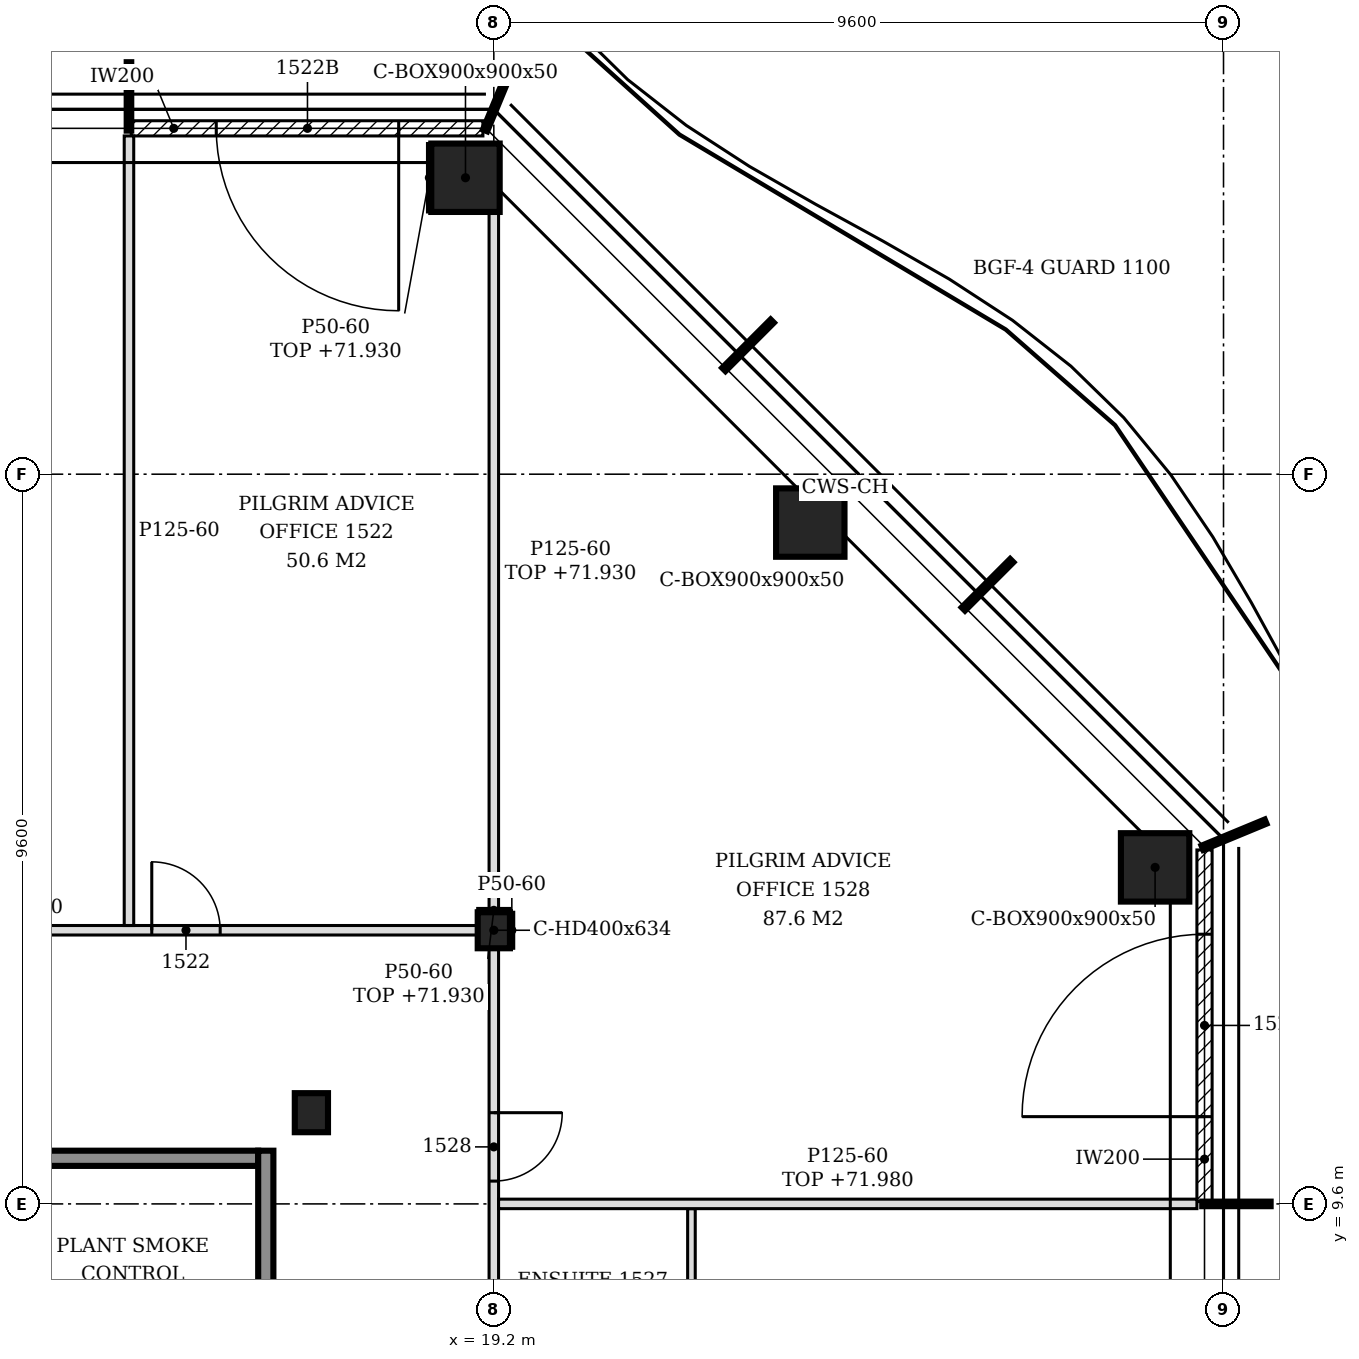
"""IFC4 building model, lengths in metres.
Left out: names, types, materials, properties, quantities, classifications, styles, units other than length and angle.
Written with IfcOpenShell. Run it as: python <this file> out.ifc"""

import sys

from ifc_helpers import new_model, si_unit, direction, frame, frame_2d, origin, origin_2d, place, context, subcontext, project, spatial, polyline, rectangle, hollow_rectangle, i_section, outline, extrude, element, fill, save


model = new_model("IFC4")
c1 = context("Model", 3, precision=1e-05, world=origin(), true_north=direction((0.0, 1.0)))
c2 = subcontext(c1, "Body", "Model", "MODEL_VIEW")
j1 = project(units=[si_unit("LENGTHUNIT", "METRE"), si_unit("PLANEANGLEUNIT", "RADIAN")], contexts=[c1])
p1 = place(None, origin())
s1 = spatial("IfcSite", under=j1, at=p1, CompositionType="ELEMENT")
p2 = place(p1, origin())
s2 = spatial("IfcBuilding", under=s1, at=p2, CompositionType="ELEMENT")
p3 = place(p2, frame((0.0, 0.0, 69.0)))
s3 = spatial("IfcBuildingStorey", under=s2, at=p3, CompositionType="ELEMENT", Elevation=69.0)
for number, where, z_axis, x_axis in (
    (1, (27.9, 14.027, -0.15), (0.0, 0.0, 1.0), (1.0, 0.0, 0.0)),
    (2, (23.364, 18.564, -0.15), (0.0, 0.0, 1.0), (1.0, 0.0, 0.0)),
    (3, (18.827, 23.1, -0.15), (0.0, 0.0, 1.0), (1.0, 0.0, 0.0)),
):
    element("IfcColumn", number, at=place(p3, frame(where, z_axis=z_axis, x_axis=x_axis)), inside=s3, PredefinedType="COLUMN", context=c2, shape_type="SweptSolid", body=[
        extrude(hollow_rectangle(XDim=0.9, YDim=0.9, WallThickness=0.05, at=origin_2d()), origin(), (0.0, 0.0, 1.0), 3.6),
    ])
p4 = place(p3, frame((19.2, 13.2, -0.15), z_axis=(0.0, 0.0, 1.0), x_axis=(1.0, 0.0, 0.0)))
e4 = element("IfcColumn", 4, at=p4, inside=s3, PredefinedType="COLUMN", context=c2, shape_type="SweptSolid", body=[
    extrude(i_section(OverallWidth=0.424, OverallDepth=0.474, WebThickness=0.048, FlangeThickness=0.077, FilletRadius=0.015, at=origin_2d()), origin(), (0.0, 0.0, 1.0), 3.6),
])
p5 = place(p3, frame((16.8, 10.8, -0.15), z_axis=(0.0, 0.0, 1.0), x_axis=(1.0, 0.0, 0.0)))
e5 = element("IfcColumn", 5, at=p5, inside=s3, PredefinedType="COLUMN", context=c2, shape_type="SweptSolid", body=[
    extrude(i_section(OverallWidth=0.437, OverallDepth=0.514, WebThickness=0.061, FlangeThickness=0.097, FilletRadius=0.015, at=origin_2d()), origin(), (0.0, 0.0, 1.0), 3.6),
])
p6 = place(p3, frame((28.55, 9.63, 0.0), z_axis=(0.0, 0.0, 1.0), x_axis=(0.0, 1.0, 0.0)))
e6 = element("IfcWall", 6, at=p6, inside=s3, PredefinedType="NOTDEFINED", context=c2, shape_type="SweptSolid", body=[
    extrude(rectangle(XDim=4.626, YDim=0.2, at=frame_2d((2.313, 0.0))), origin(), (0.0, 0.0, 1.0), 3.45),
])
p7 = place(p6, frame((1.118, 0.0, 0.0)))
e7 = element("IfcOpeningElement", 7, at=p7, cuts=e6, PredefinedType="OPENING", context=c2, shape_type="SweptSolid", body=[
    extrude(rectangle(XDim=2.4, YDim=2.4, at=frame_2d((1.2, 1.2))), frame((0.0, 0.11, 0.0), z_axis=(0.0, -1.0, 0.0), x_axis=(1.0, 0.0, 0.0)), (0.0, 0.0, 1.0), 0.22),
])
p8 = place(p3, frame((19.056, 23.75, 0.0), z_axis=(0.0, 0.0, 1.0), x_axis=(-1.0, 0.0, 0.0)))
e8 = element("IfcWall", 8, at=p8, inside=s3, PredefinedType="NOTDEFINED", context=c2, shape_type="SweptSolid", body=[
    extrude(rectangle(XDim=4.626, YDim=0.2, at=frame_2d((2.313, 0.0))), origin(), (0.0, 0.0, 1.0), 3.45),
])
p9 = place(p8, frame((1.108, 0.0, 0.0)))
e9 = element("IfcOpeningElement", 9, at=p9, cuts=e8, PredefinedType="OPENING", context=c2, shape_type="SweptSolid", body=[
    extrude(rectangle(XDim=2.4, YDim=2.4, at=frame_2d((1.2, 1.2))), frame((0.0, 0.11, 0.0), z_axis=(0.0, -1.0, 0.0), x_axis=(1.0, 0.0, 0.0)), (0.0, 0.0, 1.0), 0.22),
])
p10 = place(p3, frame((12.7, 10.2, 0.0), z_axis=(0.0, 0.0, 1.0), x_axis=(1.0, 0.0, 0.0)))
e10 = element("IfcWall", 10, at=p10, inside=s3, PredefinedType="SOLIDWALL", context=c2, shape_type="SweptSolid", body=[
    extrude(rectangle(XDim=3.4, YDim=0.2, at=frame_2d((1.7, 0.0))), origin(), (0.0, 0.0, 1.0), 3.45),
])
p11 = place(p3, frame((16.2, -5.5, 0.0), z_axis=(0.0, 0.0, 1.0), x_axis=(0.0, 1.0, 0.0)))
e11 = element("IfcWall", 11, at=p11, inside=s3, PredefinedType="SOLIDWALL", context=c2, shape_type="SweptSolid", body=[
    extrude(rectangle(XDim=15.8, YDim=0.2, at=frame_2d((7.9, 0.0))), origin(), (0.0, 0.0, 1.0), 3.45),
])
p12 = place(p11, frame((3.05, 0.0, 0.0)))
e12 = element("IfcOpeningElement", 12, at=p12, cuts=e11, PredefinedType="OPENING", context=c2, shape_type="SweptSolid", body=[
    extrude(rectangle(XDim=1.3, YDim=2.1, at=frame_2d((0.65, 1.05))), frame((0.0, 0.11, 0.0), z_axis=(0.0, -1.0, 0.0), x_axis=(1.0, 0.0, 0.0)), (0.0, 0.0, 1.0), 0.22),
])
p13 = place(p11, frame((11.45, 0.0, 0.0)))
e13 = element("IfcOpeningElement", 13, at=p13, cuts=e11, PredefinedType="OPENING", context=c2, shape_type="SweptSolid", body=[
    extrude(rectangle(XDim=1.3, YDim=2.1, at=frame_2d((0.65, 1.05))), frame((0.0, 0.11, 0.0), z_axis=(0.0, -1.0, 0.0), x_axis=(1.0, 0.0, 0.0)), (0.0, 0.0, 1.0), 0.22),
])
p14 = place(p3, frame((19.2, 2.637, 0.0), z_axis=(0.0, 0.0, 1.0), x_axis=(0.0, 1.0, 0.0)))
e14 = element("IfcWall", 14, at=p14, inside=s3, PredefinedType="PARTITIONING", context=c2, shape_type="SweptSolid", body=[
    extrude(rectangle(XDim=10.326, YDim=0.125, at=frame_2d((5.163, 0.0))), origin(), (0.0, 0.0, 1.0), 2.83),
])
p15 = place(p14, frame((3.363, 0.0, 0.0)))
e15 = element("IfcOpeningElement", 15, at=p15, cuts=e14, PredefinedType="OPENING", context=c2, shape_type="SweptSolid", body=[
    extrude(rectangle(XDim=0.9, YDim=2.1, at=frame_2d((0.45, 1.05))), frame((0.0, 0.073, 0.0), z_axis=(0.0, -1.0, 0.0), x_axis=(1.0, 0.0, 0.0)), (0.0, 0.0, 1.0), 0.145),
])
p16 = place(p14, frame((7.263, 0.0, 0.0)))
e16 = element("IfcOpeningElement", 16, at=p16, cuts=e14, PredefinedType="OPENING", context=c2, shape_type="SweptSolid", body=[
    extrude(rectangle(XDim=0.9, YDim=2.1, at=frame_2d((0.45, 1.05))), frame((0.0, 0.073, 0.0), z_axis=(0.0, -1.0, 0.0), x_axis=(1.0, 0.0, 0.0)), (0.0, 0.0, 1.0), 0.145),
])
p17 = place(p3, frame((21.8, 7.25, 0.0), z_axis=(0.0, 0.0, 1.0), x_axis=(0.0, 1.0, 0.0)))
e17 = element("IfcWall", 17, at=p17, inside=s3, PredefinedType="PARTITIONING", context=c2, shape_type="SweptSolid", body=[
    extrude(outline(polyline([(0.0, 0.0), (2.288, 0.0), (2.288, 2.98), (2.255, 2.98), (2.253, 3.45), (0.0, 3.45), (0.0, 0.0)])), frame((0.0, 0.05, 0.0), z_axis=(0.0, -1.0, 0.0), x_axis=(1.0, 0.0, 0.0)), (0.0, 0.0, 1.0), 0.1),
])
p18 = place(p3, frame((19.262, 9.6, 0.0), z_axis=(0.0, 0.0, 1.0), x_axis=(1.0, 0.0, 0.0)))
e18 = element("IfcWall", 18, at=p18, inside=s3, PredefinedType="PARTITIONING", context=c2, shape_type="SweptSolid", body=[
    extrude(outline(polyline([(0.0, 0.0), (9.188, 0.0), (9.188, 2.98), (8.788, 2.98), (8.785, 2.93), (8.488, 2.93), (8.486, 2.98), (0.087, 2.98), (0.085, 2.83), (0.0, 2.83), (0.0, 0.0)])), frame((0.0, 0.062, 0.0), z_axis=(0.0, -1.0, 0.0), x_axis=(1.0, 0.0, 0.0)), (0.0, 0.0, 1.0), 0.125),
])
p19 = place(p3, frame((7.412, 13.2, 0.0), z_axis=(0.0, 0.0, 1.0), x_axis=(1.0, 0.0, 0.0)))
e19 = element("IfcWall", 19, at=p19, inside=s3, PredefinedType="PARTITIONING", context=c2, shape_type="SweptSolid", body=[
    extrude(rectangle(XDim=11.576, YDim=0.125, at=frame_2d((5.788, 0.0))), origin(), (0.0, 0.0, 1.0), 2.83),
])
p20 = place(p19, frame((0.788, 0.0, 0.0)))
e20 = element("IfcOpeningElement", 20, at=p20, cuts=e19, PredefinedType="OPENING", context=c2, shape_type="SweptSolid", body=[
    extrude(rectangle(XDim=0.9, YDim=2.1, at=frame_2d((0.45, 1.05))), frame((0.0, 0.073, 0.0), z_axis=(0.0, -1.0, 0.0), x_axis=(1.0, 0.0, 0.0)), (0.0, 0.0, 1.0), 0.145),
])
p21 = place(p19, frame((2.302, 0.0, 0.0)))
e21 = element("IfcOpeningElement", 21, at=p21, cuts=e19, PredefinedType="OPENING", context=c2, shape_type="SweptSolid", body=[
    extrude(rectangle(XDim=0.9, YDim=2.1, at=frame_2d((0.45, 1.05))), frame((0.0, 0.073, 0.0), z_axis=(0.0, -1.0, 0.0), x_axis=(1.0, 0.0, 0.0)), (0.0, 0.0, 1.0), 0.145),
])
p22 = place(p19, frame((7.288, 0.0, 0.0)))
e22 = element("IfcOpeningElement", 22, at=p22, cuts=e19, PredefinedType="OPENING", context=c2, shape_type="SweptSolid", body=[
    extrude(rectangle(XDim=0.9, YDim=2.1, at=frame_2d((0.45, 1.05))), frame((0.0, 0.073, 0.0), z_axis=(0.0, -1.0, 0.0), x_axis=(1.0, 0.0, 0.0)), (0.0, 0.0, 1.0), 0.145),
])
p23 = place(p3, frame((14.4, 13.262, 0.0), z_axis=(0.0, 0.0, 1.0), x_axis=(0.0, 1.0, 0.0)))
e23 = element("IfcWall", 23, at=p23, inside=s3, PredefinedType="PARTITIONING", context=c2, shape_type="SweptSolid", body=[
    extrude(outline(polyline([(0.0, 0.0), (10.387, 0.0), (10.387, 3.45), (9.988, 3.45), (9.986, 2.93), (9.688, 2.93), (9.686, 3.45), (6.042, 3.45), (6.041, 2.88), (5.833, 2.88), (5.831, 3.45), (0.087, 3.45), (0.085, 2.83), (0.0, 2.83), (0.0, 0.0)])), frame((0.0, 0.062, 0.0), z_axis=(0.0, -1.0, 0.0), x_axis=(1.0, 0.0, 0.0)), (0.0, 0.0, 1.0), 0.125),
])
p24 = place(p3, frame((19.2, 13.437, 0.0), z_axis=(0.0, 0.0, 1.0), x_axis=(0.0, 1.0, 0.0)))
e24 = element("IfcWall", 24, at=p24, inside=s3, PredefinedType="PARTITIONING", context=c2, shape_type="SweptSolid", body=[
    extrude(outline(polyline([(0.0, 0.0), (9.213, 0.0), (9.213, 2.63), (8.733, 2.63), (8.731, 2.93), (0.0, 2.93), (0.0, 0.0)])), frame((0.0, 0.062, 0.0), z_axis=(0.0, -1.0, 0.0), x_axis=(1.0, 0.0, 0.0)), (0.0, 0.0, 1.0), 0.125),
])
p25 = place(p3, frame((19.437, 12.963, 0.0), z_axis=(0.0, 0.0, 1.0), x_axis=(0.0, 1.0, 0.0)))
e25 = element("IfcWall", 25, at=p25, inside=s3, PredefinedType="PARTITIONING", context=c2, shape_type="SweptSolid", body=[
    extrude(rectangle(XDim=0.474, YDim=0.05, at=frame_2d((0.237, 0.0))), origin(), (0.0, 0.0, 1.0), 3.45),
])
p26 = place(p3, frame((18.988, 13.462, 0.0), z_axis=(0.0, 0.0, 1.0), x_axis=(1.0, 0.0, 0.0)))
e26 = element("IfcWall", 26, at=p26, inside=s3, PredefinedType="PARTITIONING", context=c2, shape_type="SweptSolid", body=[
    extrude(rectangle(XDim=0.424, YDim=0.05, at=frame_2d((0.212, 0.0))), origin(), (0.0, 0.0, 1.0), 2.93),
])
p27 = place(p3, frame((18.352, 22.65, 0.0), z_axis=(0.0, 0.0, 1.0), x_axis=(0.0, 1.0, 0.0)))
e27 = element("IfcWall", 27, at=p27, inside=s3, PredefinedType="PARTITIONING", context=c2, shape_type="SweptSolid", body=[
    extrude(rectangle(XDim=0.9, YDim=0.05, at=frame_2d((0.45, 0.0))), origin(), (0.0, 0.0, 1.0), 2.93),
])
p28 = place(p7, origin())
e28 = element("IfcDoor", 28, at=p28, inside=s3, OperationType="SINGLE_SWING_LEFT", PredefinedType="DOOR", context=c2, shape_type="SweptSolid", body=[
    extrude(rectangle(XDim=2.4, YDim=2.4, at=frame_2d((1.2, 1.2))), frame((0.0, 0.025, 0.0), z_axis=(0.0, -1.0, 0.0), x_axis=(1.0, 0.0, 0.0)), (0.0, 0.0, 1.0), 0.05),
])
fill(e7, e28)
p29 = place(p9, origin())
e29 = element("IfcDoor", 29, at=p29, inside=s3, OperationType="SINGLE_SWING_LEFT", PredefinedType="DOOR", context=c2, shape_type="SweptSolid", body=[
    extrude(rectangle(XDim=2.4, YDim=2.4, at=frame_2d((1.2, 1.2))), frame((0.0, 0.025, 0.0), z_axis=(0.0, -1.0, 0.0), x_axis=(1.0, 0.0, 0.0)), (0.0, 0.0, 1.0), 0.05),
])
fill(e9, e29)
p30 = place(p22, origin())
e30 = element("IfcDoor", 30, at=p30, inside=s3, OperationType="SINGLE_SWING_LEFT", PredefinedType="DOOR", context=c2, shape_type="SweptSolid", body=[
    extrude(rectangle(XDim=0.9, YDim=2.1, at=frame_2d((0.45, 1.05))), frame((0.0, 0.025, 0.0), z_axis=(0.0, -1.0, 0.0), x_axis=(1.0, 0.0, 0.0)), (0.0, 0.0, 1.0), 0.05),
])
fill(e22, e30)
p31 = place(p16, frame((0.9, 0.0, 0.0), z_axis=(0.0, 0.0, 1.0), x_axis=(-1.0, 0.0, 0.0)))
e31 = element("IfcDoor", 31, at=p31, inside=s3, OperationType="SINGLE_SWING_LEFT", PredefinedType="DOOR", context=c2, shape_type="SweptSolid", body=[
    extrude(rectangle(XDim=0.9, YDim=2.1, at=frame_2d((0.45, 1.05))), frame((0.0, 0.025, 0.0), z_axis=(0.0, -1.0, 0.0), x_axis=(1.0, 0.0, 0.0)), (0.0, 0.0, 1.0), 0.05),
])
fill(e16, e31)
save(model, sys.argv[1])
